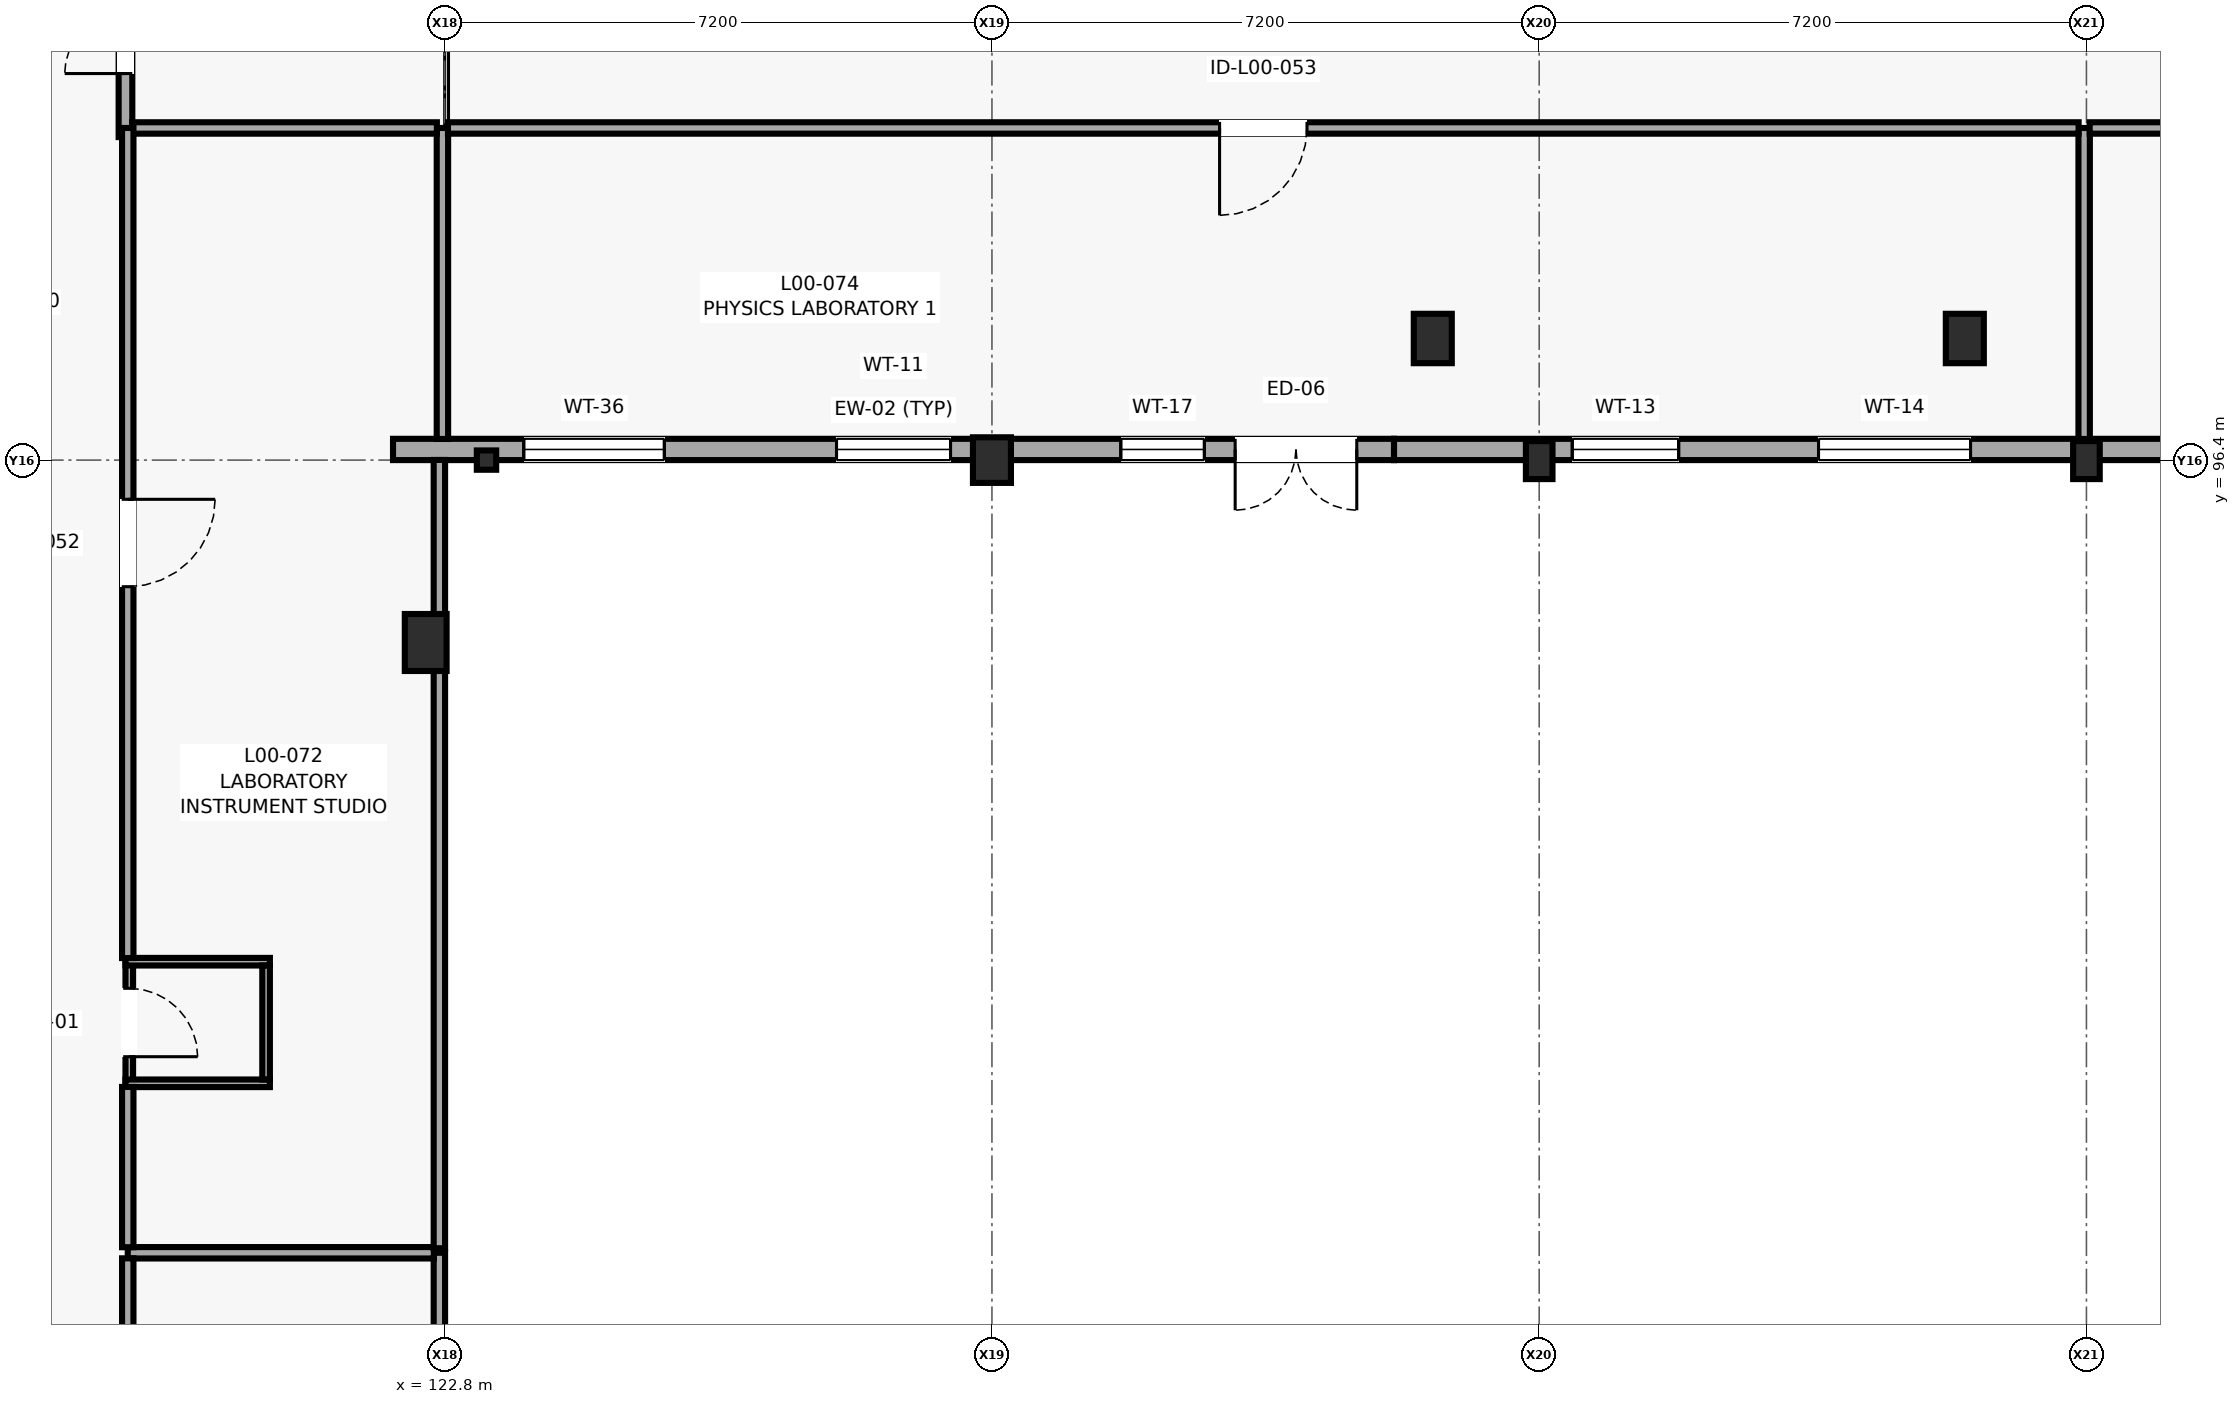
"""IFC4 building model, lengths in metres.
Left out: names, types, materials, properties, quantities, classifications, styles, units other than length and angle.
Written with IfcOpenShell. Run it as: python <this file> out.ifc"""

import sys

from ifc_helpers import new_model, si_unit, direction, frame, frame_2d, origin, origin_2d, place, context, subcontext, project, spatial, rectangle, i_section, extrude, element, fill, save


model = new_model("IFC4")
c1 = context("Model", 3, precision=1e-05, world=origin(), true_north=direction((0.0, 1.0)))
c2 = subcontext(c1, "Body", "Model", "MODEL_VIEW")
j1 = project(units=[si_unit("LENGTHUNIT", "METRE"), si_unit("PLANEANGLEUNIT", "RADIAN")], contexts=[c1])
p1 = place(None, origin())
s1 = spatial("IfcSite", under=j1, at=p1, CompositionType="ELEMENT")
p2 = place(p1, origin())
s2 = spatial("IfcBuilding", under=s1, at=p2, CompositionType="ELEMENT")
p3 = place(p2, origin())
s3 = spatial("IfcBuildingStorey", under=s2, at=p3, CompositionType="ELEMENT", Elevation=0.0)
p4 = place(p3, frame((122.55, 94.0, 0.0), z_axis=(0.0, 0.0, 1.0), x_axis=(1.0, 0.0, 0.0)))
e1 = element("IfcColumn", 1, at=p4, inside=s3, PredefinedType="COLUMN", context=c2, shape_type="SweptSolid", body=[
    extrude(rectangle(XDim=0.55, YDim=0.75, at=origin_2d()), origin(), (0.0, 0.0, 1.0), 4.2),
])
p5 = place(p3, frame((123.35, 96.4, 0.0), z_axis=(0.0, 0.0, 1.0), x_axis=(1.0, 0.0, 0.0)))
e2 = element("IfcColumn", 2, at=p5, inside=s3, PredefinedType="COLUMN", context=c2, shape_type="SweptSolid", body=[
    extrude(i_section(OverallWidth=0.255, OverallDepth=0.254, WebThickness=0.009, FlangeThickness=0.014, FilletRadius=0.013, at=origin_2d()), origin(), (0.0, 0.0, 1.0), 4.2),
])
p6 = place(p3, frame((130.0, 96.4, 0.0), z_axis=(0.0, 0.0, 1.0), x_axis=(1.0, 0.0, 0.0)))
e3 = element("IfcColumn", 3, at=p6, inside=s3, PredefinedType="PILASTER", context=c2, shape_type="SweptSolid", body=[
    extrude(rectangle(XDim=0.5, YDim=0.6, at=origin_2d()), origin(), (0.0, 0.0, 1.0), 4.2),
])
p7 = place(p3, frame((135.8, 98.0, 0.0), z_axis=(0.0, 0.0, 1.0), x_axis=(1.0, 0.0, 0.0)))
e4 = element("IfcColumn", 4, at=p7, inside=s3, PredefinedType="COLUMN", context=c2, shape_type="SweptSolid", body=[
    extrude(rectangle(XDim=0.5, YDim=0.65, at=origin_2d()), origin(), (0.0, 0.0, 1.0), 4.2),
])
p8 = place(p3, frame((137.2, 96.4, 0.0), z_axis=(0.0, 0.0, 1.0), x_axis=(1.0, 0.0, 0.0)))
e5 = element("IfcColumn", 5, at=p8, inside=s3, PredefinedType="PILASTER", context=c2, shape_type="SweptSolid", body=[
    extrude(rectangle(XDim=0.35, YDim=0.5, at=origin_2d()), origin(), (0.0, 0.0, 1.0), 4.2),
])
p9 = place(p3, frame((142.8, 98.0, 0.0), z_axis=(0.0, 0.0, 1.0), x_axis=(1.0, 0.0, 0.0)))
e6 = element("IfcColumn", 6, at=p9, inside=s3, PredefinedType="COLUMN", context=c2, shape_type="SweptSolid", body=[
    extrude(rectangle(XDim=0.5, YDim=0.65, at=origin_2d()), origin(), (0.0, 0.0, 1.0), 4.2),
])
p10 = place(p3, frame((144.4, 96.4, 0.0), z_axis=(0.0, 0.0, 1.0), x_axis=(1.0, 0.0, 0.0)))
e7 = element("IfcColumn", 7, at=p10, inside=s3, PredefinedType="PILASTER", context=c2, shape_type="SweptSolid", body=[
    extrude(rectangle(XDim=0.35, YDim=0.5, at=origin_2d()), origin(), (0.0, 0.0, 1.0), 4.2),
])
p11 = place(p3, frame((122.12, 96.54, 0.0), z_axis=(0.0, 0.0, 1.0), x_axis=(1.0, 0.0, 0.0)))
e8 = element("IfcWall", 8, at=p11, inside=s3, PredefinedType="SOLIDWALL", context=c2, shape_type="SweptSolid", body=[
    extrude(rectangle(XDim=13.17, YDim=0.28, at=frame_2d((6.585, 0.0))), origin(), (0.0, 0.0, 1.0), 3.015),
])
p12 = place(p11, frame((11.08, 0.0, 0.0)))
e9 = element("IfcOpeningElement", 9, at=p12, cuts=e8, PredefinedType="OPENING", context=c2, shape_type="SweptSolid", body=[
    extrude(rectangle(XDim=1.6, YDim=2.3, at=frame_2d((0.8, 1.15))), frame((0.0, 0.15, 0.0), z_axis=(0.0, -1.0, 0.0), x_axis=(1.0, 0.0, 0.0)), (0.0, 0.0, 1.0), 0.3),
])
p13 = place(p11, frame((1.72, 0.0, 1.05)))
e10 = element("IfcOpeningElement", 10, at=p13, cuts=e8, PredefinedType="OPENING", context=c2, shape_type="SweptSolid", body=[
    extrude(rectangle(XDim=1.85, YDim=1.4, at=frame_2d((0.925, 0.7))), frame((0.0, 0.15, 0.0), z_axis=(0.0, -1.0, 0.0), x_axis=(1.0, 0.0, 0.0)), (0.0, 0.0, 1.0), 0.3),
])
p14 = place(p11, frame((5.835, 0.0, 0.675)))
e11 = element("IfcOpeningElement", 11, at=p14, cuts=e8, PredefinedType="OPENING", context=c2, shape_type="SweptSolid", body=[
    extrude(rectangle(XDim=1.5, YDim=2.2, at=frame_2d((0.75, 1.1))), frame((0.0, 0.15, 0.0), z_axis=(0.0, -1.0, 0.0), x_axis=(1.0, 0.0, 0.0)), (0.0, 0.0, 1.0), 0.3),
])
p15 = place(p11, frame((9.575, 0.0, 0.75)))
e12 = element("IfcOpeningElement", 12, at=p15, cuts=e8, PredefinedType="OPENING", context=c2, shape_type="SweptSolid", body=[
    extrude(rectangle(XDim=1.1, YDim=2.1, at=frame_2d((0.55, 1.05))), frame((0.0, 0.15, 0.0), z_axis=(0.0, -1.0, 0.0), x_axis=(1.0, 0.0, 0.0)), (0.0, 0.0, 1.0), 0.3),
])
p16 = place(p3, frame((135.29, 96.54, 0.0), z_axis=(0.0, 0.0, 1.0), x_axis=(1.0, 0.0, 0.0)))
e13 = element("IfcWall", 13, at=p16, inside=s3, PredefinedType="SOLIDWALL", context=c2, shape_type="SweptSolid", body=[
    extrude(rectangle(XDim=13.17, YDim=0.28, at=frame_2d((6.585, 0.0))), origin(), (0.0, 0.0, 1.0), 3.215),
])
p17 = place(p16, frame((2.345, 0.0, 0.675)))
e14 = element("IfcOpeningElement", 14, at=p17, cuts=e13, PredefinedType="OPENING", context=c2, shape_type="SweptSolid", body=[
    extrude(rectangle(XDim=1.4, YDim=2.4, at=frame_2d((0.7, 1.2))), frame((0.0, 0.15, 0.0), z_axis=(0.0, -1.0, 0.0), x_axis=(1.0, 0.0, 0.0)), (0.0, 0.0, 1.0), 0.3),
])
p18 = place(p16, frame((5.585, 0.0, 0.75)))
e15 = element("IfcOpeningElement", 15, at=p18, cuts=e13, PredefinedType="OPENING", context=c2, shape_type="SweptSolid", body=[
    extrude(rectangle(XDim=2.0, YDim=2.1, at=frame_2d((1.0, 1.05))), frame((0.0, 0.15, 0.0), z_axis=(0.0, -1.0, 0.0), x_axis=(1.0, 0.0, 0.0)), (0.0, 0.0, 1.0), 0.3),
])
p19 = place(p16, frame((10.15, 0.0, 0.85)))
e16 = element("IfcOpeningElement", 16, at=p19, cuts=e13, PredefinedType="OPENING", context=c2, shape_type="SweptSolid", body=[
    extrude(rectangle(XDim=1.65, YDim=1.95, at=frame_2d((0.825, 0.975))), frame((0.0, 0.15, 0.0), z_axis=(0.0, -1.0, 0.0), x_axis=(1.0, 0.0, 0.0)), (0.0, 0.0, 1.0), 0.3),
])
p20 = place(p3, frame((118.6, 100.65, 0.0), z_axis=(0.0, 0.0, 1.0), x_axis=(0.0, 1.0, 0.0)))
e17 = element("IfcWall", 17, at=p20, inside=s3, PredefinedType="PARTITIONING", context=c2, shape_type="SweptSolid", body=[
    extrude(rectangle(XDim=3.272, YDim=0.18, at=frame_2d((1.636, 0.0))), origin(), (0.0, 0.0, 1.0), 3.98),
])
p21 = place(p20, frame((0.836, 0.0, 0.0)))
e18 = element("IfcOpeningElement", 18, at=p21, cuts=e17, PredefinedType="OPENING", context=c2, shape_type="SweptSolid", body=[
    extrude(rectangle(XDim=1.6, YDim=2.25, at=frame_2d((0.8, 1.125))), frame((0.0, 0.1, 0.0), z_axis=(0.0, -1.0, 0.0), x_axis=(1.0, 0.0, 0.0)), (0.0, 0.0, 1.0), 0.2),
])
p22 = place(p3, frame((118.65, 88.2, 0.0), z_axis=(0.0, 0.0, 1.0), x_axis=(0.0, 1.0, 0.0)))
e19 = element("IfcWall", 19, at=p22, inside=s3, PredefinedType="PARTITIONING", context=c2, shape_type="SweptSolid", body=[
    extrude(rectangle(XDim=1.6, YDim=0.1, at=frame_2d((0.8, 0.0))), origin(), (0.0, 0.0, 1.0), 3.315),
])
p23 = place(p22, frame((0.35, 0.0, 0.0)))
e20 = element("IfcOpeningElement", 20, at=p23, cuts=e19, PredefinedType="OPENING", context=c2, shape_type="SweptSolid", body=[
    extrude(rectangle(XDim=0.9, YDim=2.05, at=frame_2d((0.45, 1.025))), frame((0.0, 0.06, 0.0), z_axis=(0.0, -1.0, 0.0), x_axis=(1.0, 0.0, 0.0)), (0.0, 0.0, 1.0), 0.12),
])
for number, where, z_axis, x_axis in (
    (21, (118.6, 88.2, 0.0), (0.0, 0.0, 1.0), (1.0, 0.0, 0.0)),
    (22, (118.6, 89.8, 0.0), (0.0, 0.0, 1.0), (1.0, 0.0, 0.0)),
):
    element("IfcWall", number, at=place(p3, frame(where, z_axis=z_axis, x_axis=x_axis)), inside=s3, PredefinedType="PARTITIONING", context=c2, shape_type="SweptSolid", body=[
        extrude(rectangle(XDim=1.9, YDim=0.1, at=frame_2d((0.95, 0.0))), origin(), (0.0, 0.0, 1.0), 3.98),
    ])
p24 = place(p3, frame((120.45, 88.25, 0.0), z_axis=(0.0, 0.0, 1.0), x_axis=(0.0, 1.0, 0.0)))
e23 = element("IfcWall", 23, at=p24, inside=s3, PredefinedType="PARTITIONING", context=c2, shape_type="SweptSolid", body=[
    extrude(rectangle(XDim=1.5, YDim=0.1, at=frame_2d((0.75, 0.0))), origin(), (0.0, 0.0, 1.0), 3.98),
])
p25 = place(p3, frame((122.73, 71.878, 0.0), z_axis=(0.0, 0.0, 1.0), x_axis=(0.0, 1.0, 0.0)))
e24 = element("IfcWall", 24, at=p25, inside=s3, PredefinedType="PARTITIONING", context=c2, shape_type="SweptSolid", body=[
    extrude(rectangle(XDim=14.092, YDim=0.15, at=frame_2d((7.046, 0.0))), origin(), (0.0, 0.0, 1.0), 3.365),
])
p26 = place(p3, frame((122.657, 85.97, 0.0), z_axis=(0.0, 0.0, 1.0), x_axis=(-1.0, 0.0, 0.0)))
e25 = element("IfcWall", 25, at=p26, inside=s3, PredefinedType="PARTITIONING", context=c2, shape_type="SweptSolid", body=[
    extrude(rectangle(XDim=4.027, YDim=0.15, at=frame_2d((2.014, 0.0))), origin(), (0.0, 0.0, 1.0), 3.915),
])
p27 = place(p3, frame((118.63, 85.897, 0.0), z_axis=(0.0, 0.0, 1.0), x_axis=(0.0, -1.0, 0.0)))
e26 = element("IfcWall", 26, at=p27, inside=s3, PredefinedType="PARTITIONING", context=c2, shape_type="SweptSolid", body=[
    extrude(rectangle(XDim=12.209, YDim=0.15, at=frame_2d((6.104, 0.0))), origin(), (0.0, 0.0, 1.0), 3.315),
])
p28 = place(p27, frame((5.63, 0.0, 0.0)))
e27 = element("IfcOpeningElement", 27, at=p28, cuts=e26, PredefinedType="OPENING", context=c2, shape_type="SweptSolid", body=[
    extrude(rectangle(XDim=0.95, YDim=2.1, at=frame_2d((0.475, 1.05))), frame((0.0, 0.085, 0.0), z_axis=(0.0, -1.0, 0.0), x_axis=(1.0, 0.0, 0.0)), (0.0, 0.0, 1.0), 0.17),
])
p29 = place(p3, frame((122.77, 96.678, 0.0), z_axis=(0.0, 0.0, 1.0), x_axis=(0.0, 1.0, 0.0)))
e28 = element("IfcWall", 28, at=p29, inside=s3, PredefinedType="PARTITIONING", context=c2, shape_type="SweptSolid", body=[
    extrude(rectangle(XDim=4.092, YDim=0.15, at=frame_2d((2.046, 0.0))), origin(), (0.0, 0.0, 1.0), 3.915),
])
p30 = place(p3, frame((122.697, 100.77, 0.0), z_axis=(0.0, 0.0, 1.0), x_axis=(-1.0, 0.0, 0.0)))
e29 = element("IfcWall", 29, at=p30, inside=s3, PredefinedType="PARTITIONING", context=c2, shape_type="SweptSolid", body=[
    extrude(rectangle(XDim=4.009, YDim=0.15, at=frame_2d((2.004, 0.0))), origin(), (0.0, 0.0, 1.0), 3.915),
])
p31 = place(p3, frame((118.63, 100.77, 0.0), z_axis=(0.0, 0.0, 1.0), x_axis=(0.0, -1.0, 0.0)))
e30 = element("IfcWall", 30, at=p31, inside=s3, PredefinedType="PARTITIONING", context=c2, shape_type="SweptSolid", body=[
    extrude(rectangle(XDim=10.922, YDim=0.15, at=frame_2d((5.461, 0.0))), origin(), (0.0, 0.0, 1.0), 3.315),
])
p32 = place(p31, frame((4.886, 0.0, 0.0)))
e31 = element("IfcOpeningElement", 31, at=p32, cuts=e30, PredefinedType="OPENING", context=c2, shape_type="SweptSolid", body=[
    extrude(rectangle(XDim=1.15, YDim=2.2, at=frame_2d((0.575, 1.1))), frame((0.0, 0.085, 0.0), z_axis=(0.0, -1.0, 0.0), x_axis=(1.0, 0.0, 0.0)), (0.0, 0.0, 1.0), 0.17),
])
p33 = place(p3, frame((118.63, 88.152, 0.0), z_axis=(0.0, 0.0, 1.0), x_axis=(0.0, -1.0, 0.0)))
e32 = element("IfcWall", 32, at=p33, inside=s3, PredefinedType="PARTITIONING", context=c2, shape_type="SweptSolid", body=[
    extrude(rectangle(XDim=2.109, YDim=0.15, at=frame_2d((1.055, 0.0))), origin(), (0.0, 0.0, 1.0), 3.315),
])
p34 = place(p3, frame((122.73, 86.03, 0.0), z_axis=(0.0, 0.0, 1.0), x_axis=(0.0, 1.0, 0.0)))
e33 = element("IfcWall", 33, at=p34, inside=s3, PredefinedType="PARTITIONING", context=c2, shape_type="SweptSolid", body=[
    extrude(rectangle(XDim=10.372, YDim=0.15, at=frame_2d((5.186, 0.0))), origin(), (0.0, 0.0, 1.0), 3.365),
])
p35 = place(p3, frame((144.37, 96.678, 0.0), z_axis=(0.0, 0.0, 1.0), x_axis=(0.0, 1.0, 0.0)))
e34 = element("IfcWall", 34, at=p35, inside=s3, PredefinedType="PARTITIONING", context=c2, shape_type="SweptSolid", body=[
    extrude(rectangle(XDim=4.092, YDim=0.15, at=frame_2d((2.046, 0.0))), origin(), (0.0, 0.0, 1.0), 3.365),
])
p36 = place(p3, frame((144.297, 100.77, 0.0), z_axis=(0.0, 0.0, 1.0), x_axis=(-1.0, 0.0, 0.0)))
e35 = element("IfcWall", 35, at=p36, inside=s3, PredefinedType="PARTITIONING", context=c2, shape_type="SweptSolid", body=[
    extrude(rectangle(XDim=21.454, YDim=0.15, at=frame_2d((10.727, 0.0))), origin(), (0.0, 0.0, 1.0), 3.915),
])
p37 = place(p36, frame((10.152, 0.0, 0.0)))
e36 = element("IfcOpeningElement", 36, at=p37, cuts=e35, PredefinedType="OPENING", context=c2, shape_type="SweptSolid", body=[
    extrude(rectangle(XDim=1.15, YDim=2.2, at=frame_2d((0.575, 1.1))), frame((0.0, 0.085, 0.0), z_axis=(0.0, -1.0, 0.0), x_axis=(1.0, 0.0, 0.0)), (0.0, 0.0, 1.0), 0.17),
])
p38 = place(p3, frame((165.655, 100.77, 0.0), z_axis=(0.0, 0.0, 1.0), x_axis=(-1.0, 0.0, 0.0)))
e37 = element("IfcWall", 37, at=p38, inside=s3, PredefinedType="PARTITIONING", context=c2, shape_type="SweptSolid", body=[
    extrude(rectangle(XDim=21.212, YDim=0.15, at=frame_2d((10.606, 0.0))), origin(), (0.0, 0.0, 1.0), 3.915),
])
p39 = place(p38, frame((10.031, 0.0, 0.0)))
e38 = element("IfcOpeningElement", 38, at=p39, cuts=e37, PredefinedType="OPENING", context=c2, shape_type="SweptSolid", body=[
    extrude(rectangle(XDim=1.15, YDim=2.2, at=frame_2d((0.575, 1.1))), frame((0.0, 0.085, 0.0), z_axis=(0.0, -1.0, 0.0), x_axis=(1.0, 0.0, 0.0)), (0.0, 0.0, 1.0), 0.17),
])
p40 = place(p12, frame((1.6, 0.0, 0.0), z_axis=(0.0, 0.0, 1.0), x_axis=(-1.0, 0.0, 0.0)))
e39 = element("IfcDoor", 39, at=p40, inside=s3, OperationType="DOUBLE_DOOR_SINGLE_SWING", PredefinedType="DOOR", context=c2, shape_type="SweptSolid", body=[
    extrude(rectangle(XDim=1.6, YDim=2.3, at=frame_2d((0.8, 1.15))), frame((0.0, 0.025, 0.0), z_axis=(0.0, -1.0, 0.0), x_axis=(1.0, 0.0, 0.0)), (0.0, 0.0, 1.0), 0.05),
])
fill(e9, e39)
p41 = place(p13, origin())
e40 = element("IfcWindow", 40, at=p41, inside=s3, PartitioningType="SINGLE_PANEL", PredefinedType="WINDOW", context=c2, shape_type="SweptSolid", body=[
    extrude(rectangle(XDim=1.85, YDim=1.4, at=frame_2d((0.925, 0.7))), frame((0.0, 0.03, 0.0), z_axis=(0.0, -1.0, 0.0), x_axis=(1.0, 0.0, 0.0)), (0.0, 0.0, 1.0), 0.06),
])
fill(e10, e40)
p42 = place(p14, origin())
e41 = element("IfcWindow", 41, at=p42, inside=s3, PartitioningType="SINGLE_PANEL", PredefinedType="WINDOW", context=c2, shape_type="SweptSolid", body=[
    extrude(rectangle(XDim=1.5, YDim=2.2, at=frame_2d((0.75, 1.1))), frame((0.0, 0.03, 0.0), z_axis=(0.0, -1.0, 0.0), x_axis=(1.0, 0.0, 0.0)), (0.0, 0.0, 1.0), 0.06),
])
fill(e11, e41)
p43 = place(p15, origin())
e42 = element("IfcWindow", 42, at=p43, inside=s3, PartitioningType="SINGLE_PANEL", PredefinedType="WINDOW", context=c2, shape_type="SweptSolid", body=[
    extrude(rectangle(XDim=1.1, YDim=2.1, at=frame_2d((0.55, 1.05))), frame((0.0, 0.03, 0.0), z_axis=(0.0, -1.0, 0.0), x_axis=(1.0, 0.0, 0.0)), (0.0, 0.0, 1.0), 0.06),
])
fill(e12, e42)
p44 = place(p17, origin())
e43 = element("IfcWindow", 43, at=p44, inside=s3, PartitioningType="SINGLE_PANEL", PredefinedType="WINDOW", context=c2, shape_type="SweptSolid", body=[
    extrude(rectangle(XDim=1.4, YDim=2.4, at=frame_2d((0.7, 1.2))), frame((0.0, 0.03, 0.0), z_axis=(0.0, -1.0, 0.0), x_axis=(1.0, 0.0, 0.0)), (0.0, 0.0, 1.0), 0.06),
])
fill(e14, e43)
p45 = place(p18, origin())
e44 = element("IfcWindow", 44, at=p45, inside=s3, PartitioningType="SINGLE_PANEL", PredefinedType="WINDOW", context=c2, shape_type="SweptSolid", body=[
    extrude(rectangle(XDim=2.0, YDim=2.1, at=frame_2d((1.0, 1.05))), frame((0.0, 0.03, 0.0), z_axis=(0.0, -1.0, 0.0), x_axis=(1.0, 0.0, 0.0)), (0.0, 0.0, 1.0), 0.06),
])
fill(e15, e44)
p46 = place(p21, origin())
e45 = element("IfcDoor", 45, at=p46, inside=s3, OperationType="DOUBLE_DOOR_SINGLE_SWING", PredefinedType="DOOR", context=c2, shape_type="SweptSolid", body=[
    extrude(rectangle(XDim=1.6, YDim=2.25, at=frame_2d((0.8, 1.125))), frame((0.0, 0.025, 0.0), z_axis=(0.0, -1.0, 0.0), x_axis=(1.0, 0.0, 0.0)), (0.0, 0.0, 1.0), 0.05),
])
fill(e18, e45)
p47 = place(p23, frame((0.9, 0.0, 0.0), z_axis=(0.0, 0.0, 1.0), x_axis=(-1.0, 0.0, 0.0)))
e46 = element("IfcDoor", 46, at=p47, inside=s3, OperationType="SINGLE_SWING_LEFT", PredefinedType="USERDEFINED", context=c2, shape_type="SweptSolid", body=[
    extrude(rectangle(XDim=0.9, YDim=2.05, at=frame_2d((0.45, 1.025))), frame((0.0, 0.025, 0.0), z_axis=(0.0, -1.0, 0.0), x_axis=(1.0, 0.0, 0.0)), (0.0, 0.0, 1.0), 0.05),
])
fill(e20, e46)
p48 = place(p32, origin())
e47 = element("IfcDoor", 47, at=p48, inside=s3, OperationType="SINGLE_SWING_LEFT", PredefinedType="DOOR", context=c2, shape_type="SweptSolid", body=[
    extrude(rectangle(XDim=1.15, YDim=2.2, at=frame_2d((0.575, 1.1))), frame((0.0, 0.025, 0.0), z_axis=(0.0, -1.0, 0.0), x_axis=(1.0, 0.0, 0.0)), (0.0, 0.0, 1.0), 0.05),
])
fill(e31, e47)
p49 = place(p37, origin())
e48 = element("IfcDoor", 48, at=p49, inside=s3, OperationType="SINGLE_SWING_RIGHT", PredefinedType="DOOR", context=c2, shape_type="SweptSolid", body=[
    extrude(rectangle(XDim=1.15, YDim=2.2, at=frame_2d((0.575, 1.1))), frame((0.0, 0.025, 0.0), z_axis=(0.0, -1.0, 0.0), x_axis=(1.0, 0.0, 0.0)), (0.0, 0.0, 1.0), 0.05),
])
fill(e36, e48)
save(model, sys.argv[1])
